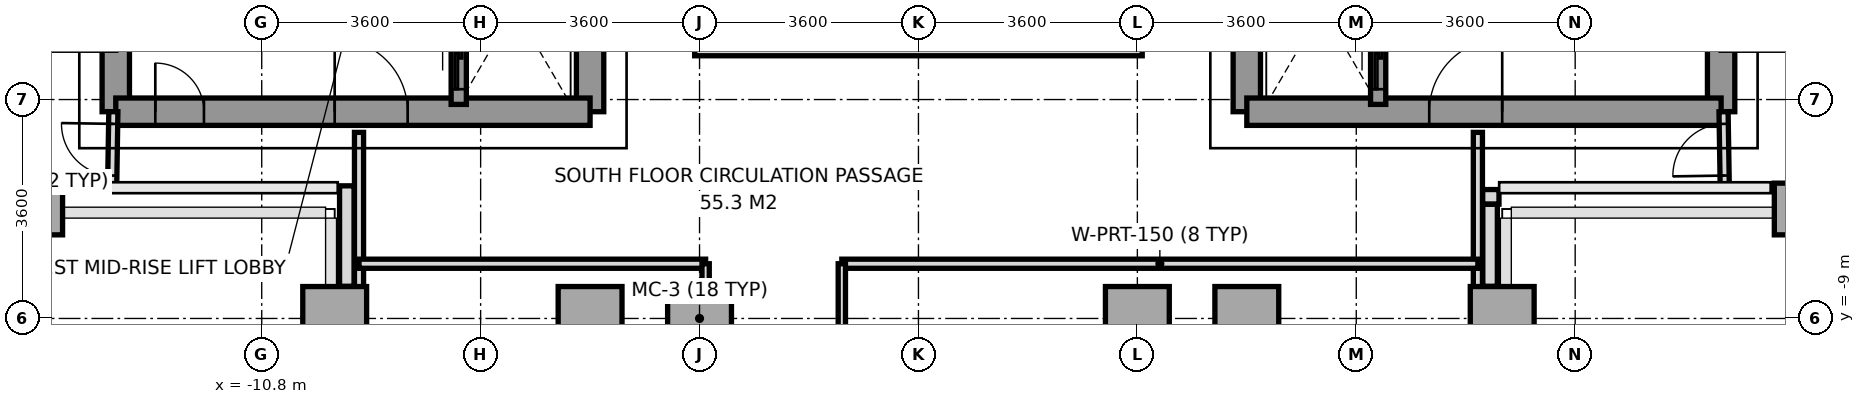
"""IFC4 building model, lengths in metres.
Left out: names, types, materials, properties, quantities, classifications, styles, units other than length and angle.
Written with IfcOpenShell. Run it as: python <this file> out.ifc"""

import sys

from ifc_helpers import new_model, si_unit, direction, frame, frame_2d, origin, origin_2d, place, context, subcontext, project, spatial, rectangle, extrude, source, transform, mapped, element, fill, save


model = new_model("IFC4")
c1 = context("Model", 3, precision=1e-05, world=origin(), true_north=direction((0.0, 1.0)))
c2 = subcontext(c1, "Body", "Model", "MODEL_VIEW")
j1 = project(units=[si_unit("LENGTHUNIT", "METRE"), si_unit("PLANEANGLEUNIT", "RADIAN")], contexts=[c1])
p1 = place(None, origin())
s1 = spatial("IfcSite", under=j1, at=p1, CompositionType="ELEMENT")
p2 = place(p1, origin())
s2 = spatial("IfcBuilding", under=s1, at=p2, CompositionType="ELEMENT")
p3 = place(p2, frame((0.0, 0.0, 104.0)))
s3 = spatial("IfcBuildingStorey", under=s2, at=p3, CompositionType="ELEMENT", Elevation=104.0)
m1 = source(origin(), c2, "Body", "SweptSolid", [
    extrude(rectangle(XDim=0.65, YDim=0.85, at=origin_2d()), origin(), (0.0, 0.0, 1.0), 3.2),
])
p4 = place(p3, frame((-14.4, -7.2, 0.0), z_axis=(0.0, 0.0, 1.0), x_axis=(1.0, 0.0, 0.0)))
e1 = element("IfcColumn", 1, at=p4, inside=s3, PredefinedType="COLUMN", context=c2, shape_type="MappedRepresentation", body=[
    mapped(m1, transform((0.0, 0.0, 0.0), x_axis=(1.0, 0.0, 0.0), y_axis=(0.0, 1.0, 0.0), z_axis=(0.0, 0.0, 1.0), scale=1.0)),
])
m2 = source(origin(), c2, "Body", "SweptSolid", [
    extrude(rectangle(XDim=1.05, YDim=1.05, at=origin_2d()), origin(), (0.0, 0.0, 1.0), 3.2),
])
for number, where, z_axis, x_axis in (
    (2, (-9.6, -9.0, 0.0), (0.0, 0.0, 1.0), (1.0, 0.0, 0.0)),
    (3, (-5.4, -9.0, 0.0), (0.0, 0.0, 1.0), (1.0, 0.0, 0.0)),
    (4, (-3.6, -9.0, 0.0), (0.0, 0.0, 1.0), (1.0, 0.0, 0.0)),
    (5, (3.6, -9.0, 0.0), (0.0, 0.0, 1.0), (1.0, 0.0, 0.0)),
    (6, (5.4, -9.0, 0.0), (0.0, 0.0, 1.0), (1.0, 0.0, 0.0)),
    (7, (9.6, -9.0, 0.0), (0.0, 0.0, 1.0), (1.0, 0.0, 0.0)),
):
    element("IfcColumn", number, at=place(p3, frame(where, z_axis=z_axis, x_axis=x_axis)), inside=s3, PredefinedType="COLUMN", context=c2, shape_type="MappedRepresentation", body=[
        mapped(m2, transform((0.0, 0.0, 0.0), x_axis=(1.0, 0.0, 0.0), y_axis=(0.0, 1.0, 0.0), z_axis=(0.0, 0.0, 1.0), scale=1.0)),
    ])
p5 = place(p3, frame((14.4, -7.2, 0.0), z_axis=(0.0, 0.0, 1.0), x_axis=(1.0, 0.0, 0.0)))
e8 = element("IfcColumn", 8, at=p5, inside=s3, PredefinedType="COLUMN", context=c2, shape_type="MappedRepresentation", body=[
    mapped(m1, transform((0.0, 0.0, 0.0), x_axis=(1.0, 0.0, 0.0), y_axis=(0.0, 1.0, 0.0), z_axis=(0.0, 0.0, 1.0), scale=1.0)),
])
p6 = place(p3, frame((9.547, -7.0, 0.0), z_axis=(0.0, 0.0, 1.0), x_axis=(-1.0, 0.0, 0.0)))
e9 = element("IfcWall", 9, at=p6, inside=s3, PredefinedType="PARAPET", context=c2, shape_type="SweptSolid", body=[
    extrude(rectangle(XDim=0.269, YDim=0.24, at=frame_2d((0.135, 0.0))), origin(), (0.0, 0.0, 1.0), 1.15),
])
p7 = place(p3, frame((9.4, -7.123, 0.0), z_axis=(0.0, 0.0, 1.0), x_axis=(0.0, -1.0, 0.0)))
e10 = element("IfcWall", 10, at=p7, inside=s3, PredefinedType="PARAPET", context=c2, shape_type="SweptSolid", body=[
    extrude(rectangle(XDim=1.349, YDim=0.24, at=frame_2d((0.674, 0.0))), origin(), (0.0, 0.0, 1.0), 1.15),
])
p8 = place(p3, frame((-9.4, -8.472, 0.0), z_axis=(0.0, 0.0, 1.0), x_axis=(0.0, 1.0, 0.0)))
e11 = element("IfcWall", 11, at=p8, inside=s3, PredefinedType="PARAPET", context=c2, shape_type="SweptSolid", body=[
    extrude(rectangle(XDim=1.653, YDim=0.24, at=frame_2d((0.827, 0.0))), origin(), (0.0, 0.0, 1.0), 1.15),
])
p9 = place(p3, frame((-13.2, -5.6, 0.0), z_axis=(0.0, 0.0, 1.0), x_axis=(0.0, 1.0, 0.0)))
e12 = element("IfcWall", 12, at=p9, inside=s3, PredefinedType="SHEAR", context=c2, shape_type="SweptSolid", body=[
    extrude(rectangle(XDim=11.2, YDim=0.45, at=frame_2d((5.6, 0.0))), origin(), (0.0, 0.0, 1.0), 3.2),
])
p10 = place(p3, frame((-5.4, -5.6, 0.0), z_axis=(0.0, 0.0, 1.0), x_axis=(0.0, 1.0, 0.0)))
e13 = element("IfcWall", 13, at=p10, inside=s3, PredefinedType="SHEAR", context=c2, shape_type="SweptSolid", body=[
    extrude(rectangle(XDim=12.5, YDim=0.45, at=frame_2d((6.25, 0.0))), origin(), (0.0, 0.0, 1.0), 3.2),
])
p11 = place(p10, frame((4.55, 0.0, 0.0)))
e14 = element("IfcOpeningElement", 14, at=p11, cuts=e13, PredefinedType="OPENING", context=c2, shape_type="SweptSolid", body=[
    extrude(rectangle(XDim=1.2, YDim=2.2, at=frame_2d((0.6, 1.1))), frame((0.0, 0.235, 0.0), z_axis=(0.0, -1.0, 0.0), x_axis=(1.0, 0.0, 0.0)), (0.0, 0.0, 1.0), 0.47),
])
p12 = place(p10, frame((6.86, 0.0, 0.0)))
e15 = element("IfcOpeningElement", 15, at=p12, cuts=e13, PredefinedType="OPENING", context=c2, shape_type="SweptSolid", body=[
    extrude(rectangle(XDim=0.8, YDim=2.1, at=frame_2d((0.4, 1.05))), frame((0.0, 0.235, 0.0), z_axis=(0.0, -1.0, 0.0), x_axis=(1.0, 0.0, 0.0)), (0.0, 0.0, 1.0), 0.47),
])
p13 = place(p3, frame((-13.2, -5.6, 0.0), z_axis=(0.0, 0.0, 1.0), x_axis=(1.0, 0.0, 0.0)))
e16 = element("IfcWall", 16, at=p13, inside=s3, PredefinedType="SHEAR", context=c2, shape_type="SweptSolid", body=[
    extrude(rectangle(XDim=7.8, YDim=0.45, at=frame_2d((3.9, 0.0))), origin(), (0.0, 0.0, 1.0), 3.2),
])
p14 = place(p13, frame((3.6, 0.0, 0.0)))
e17 = element("IfcOpeningElement", 17, at=p14, cuts=e16, PredefinedType="OPENING", context=c2, shape_type="SweptSolid", body=[
    extrude(rectangle(XDim=1.2, YDim=2.2, at=frame_2d((0.6, 1.1))), frame((0.0, 0.235, 0.0), z_axis=(0.0, -1.0, 0.0), x_axis=(1.0, 0.0, 0.0)), (0.0, 0.0, 1.0), 0.47),
])
p15 = place(p13, frame((0.65, 0.0, 0.0)))
e18 = element("IfcOpeningElement", 18, at=p15, cuts=e16, PredefinedType="OPENING", context=c2, shape_type="SweptSolid", body=[
    extrude(rectangle(XDim=0.8, YDim=2.1, at=frame_2d((0.4, 1.05))), frame((0.0, 0.235, 0.0), z_axis=(0.0, -1.0, 0.0), x_axis=(1.0, 0.0, 0.0)), (0.0, 0.0, 1.0), 0.47),
])
p16 = place(p3, frame((13.2, -5.6, 0.0), z_axis=(0.0, 0.0, 1.0), x_axis=(0.0, 1.0, 0.0)))
e19 = element("IfcWall", 19, at=p16, inside=s3, PredefinedType="SHEAR", context=c2, shape_type="SweptSolid", body=[
    extrude(rectangle(XDim=11.2, YDim=0.45, at=frame_2d((5.6, 0.0))), origin(), (0.0, 0.0, 1.0), 3.2),
])
p17 = place(p3, frame((5.4, -5.6, 0.0), z_axis=(0.0, 0.0, 1.0), x_axis=(0.0, 1.0, 0.0)))
e20 = element("IfcWall", 20, at=p17, inside=s3, PredefinedType="SHEAR", context=c2, shape_type="SweptSolid", body=[
    extrude(rectangle(XDim=12.5, YDim=0.45, at=frame_2d((6.25, 0.0))), origin(), (0.0, 0.0, 1.0), 3.2),
])
p18 = place(p17, frame((4.55, 0.0, 0.0)))
e21 = element("IfcOpeningElement", 21, at=p18, cuts=e20, PredefinedType="OPENING", context=c2, shape_type="SweptSolid", body=[
    extrude(rectangle(XDim=1.2, YDim=2.2, at=frame_2d((0.6, 1.1))), frame((0.0, 0.235, 0.0), z_axis=(0.0, -1.0, 0.0), x_axis=(1.0, 0.0, 0.0)), (0.0, 0.0, 1.0), 0.47),
])
p19 = place(p17, frame((6.86, 0.0, 0.0)))
e22 = element("IfcOpeningElement", 22, at=p19, cuts=e20, PredefinedType="OPENING", context=c2, shape_type="SweptSolid", body=[
    extrude(rectangle(XDim=0.8, YDim=2.1, at=frame_2d((0.4, 1.05))), frame((0.0, 0.235, 0.0), z_axis=(0.0, -1.0, 0.0), x_axis=(1.0, 0.0, 0.0)), (0.0, 0.0, 1.0), 0.47),
])
p20 = place(p3, frame((5.4, -5.6, 0.0), z_axis=(0.0, 0.0, 1.0), x_axis=(1.0, 0.0, 0.0)))
e23 = element("IfcWall", 23, at=p20, inside=s3, PredefinedType="SHEAR", context=c2, shape_type="SweptSolid", body=[
    extrude(rectangle(XDim=7.8, YDim=0.45, at=frame_2d((3.9, 0.0))), origin(), (0.0, 0.0, 1.0), 3.2),
])
p21 = place(p20, frame((3.0, 0.0, 0.0)))
e24 = element("IfcOpeningElement", 24, at=p21, cuts=e23, PredefinedType="OPENING", context=c2, shape_type="SweptSolid", body=[
    extrude(rectangle(XDim=1.2, YDim=2.2, at=frame_2d((0.6, 1.1))), frame((0.0, 0.235, 0.0), z_axis=(0.0, -1.0, 0.0), x_axis=(1.0, 0.0, 0.0)), (0.0, 0.0, 1.0), 0.47),
])
p22 = place(p3, frame((-7.56, -5.48, 0.0), z_axis=(0.0, 0.0, 1.0), x_axis=(0.0, 1.0, 0.0)))
e25 = element("IfcWall", 25, at=p22, inside=s3, PredefinedType="SOLIDWALL", context=c2, shape_type="SweptSolid", body=[
    extrude(rectangle(XDim=1.6, YDim=0.25, at=frame_2d((0.8, 0.0))), origin(), (0.0, 0.0, 1.0), 3.2),
])
p23 = place(p22, frame((0.25, 0.0, 0.0)))
e26 = element("IfcOpeningElement", 26, at=p23, cuts=e25, PredefinedType="OPENING", context=c2, shape_type="SweptSolid", body=[
    extrude(rectangle(XDim=1.1, YDim=2.2, at=frame_2d((0.55, 1.1))), frame((0.0, 0.135, 0.0), z_axis=(0.0, -1.0, 0.0), x_axis=(1.0, 0.0, 0.0)), (0.0, 0.0, 1.0), 0.27),
])
p24 = place(p3, frame((7.56, -5.48, 0.0), z_axis=(0.0, 0.0, 1.0), x_axis=(0.0, 1.0, 0.0)))
e27 = element("IfcWall", 27, at=p24, inside=s3, PredefinedType="SOLIDWALL", context=c2, shape_type="SweptSolid", body=[
    extrude(rectangle(XDim=1.6, YDim=0.25, at=frame_2d((0.8, 0.0))), origin(), (0.0, 0.0, 1.0), 3.2),
])
p25 = place(p24, frame((0.25, 0.0, 0.0)))
e28 = element("IfcOpeningElement", 28, at=p25, cuts=e27, PredefinedType="OPENING", context=c2, shape_type="SweptSolid", body=[
    extrude(rectangle(XDim=1.1, YDim=2.2, at=frame_2d((0.55, 1.1))), frame((0.0, 0.135, 0.0), z_axis=(0.0, -1.0, 0.0), x_axis=(1.0, 0.0, 0.0)), (0.0, 0.0, 1.0), 0.27),
])
for number, where, z_axis, x_axis in (
    (29, (-9.2, -15.68, 0.0), (0.0, 0.0, 1.0), (0.0, 1.0, 0.0)),
    (30, (9.2, -15.68, 0.0), (0.0, 0.0, 1.0), (0.0, 1.0, 0.0)),
):
    element("IfcWall", number, at=place(p3, frame(where, z_axis=z_axis, x_axis=x_axis)), inside=s3, PredefinedType="PARTITIONING", context=c2, shape_type="SweptSolid", body=[
        extrude(rectangle(XDim=9.74, YDim=0.15, at=frame_2d((4.87, 0.0))), origin(), (0.0, 0.0, 1.0), 2.7),
    ])
p26 = place(p3, frame((-9.2, -8.1, 0.0), z_axis=(0.0, 0.0, 1.0), x_axis=(1.0, 0.0, 0.0)))
e31 = element("IfcWall", 31, at=p26, inside=s3, PredefinedType="PARTITIONING", context=c2, shape_type="SweptSolid", body=[
    extrude(rectangle(XDim=5.7, YDim=0.15, at=frame_2d((2.85, 0.0))), origin(), (0.0, 0.0, 1.0), 2.76),
])
p27 = place(p3, frame((-1.26, -8.1, 0.0), z_axis=(0.0, 0.0, 1.0), x_axis=(1.0, 0.0, 0.0)))
e32 = element("IfcWall", 32, at=p27, inside=s3, PredefinedType="PARTITIONING", context=c2, shape_type="SweptSolid", body=[
    extrude(rectangle(XDim=10.46, YDim=0.15, at=frame_2d((5.23, 0.0))), origin(), (0.0, 0.0, 1.0), 2.76),
])
p28 = place(p3, frame((-3.5, -20.42, 0.0), z_axis=(0.0, 0.0, 1.0), x_axis=(0.0, 1.0, 0.0)))
e33 = element("IfcWall", 33, at=p28, inside=s3, PredefinedType="PARTITIONING", context=c2, shape_type="SweptSolid", body=[
    extrude(rectangle(XDim=12.32, YDim=0.12, at=frame_2d((6.16, 0.0))), origin(), (0.0, 0.0, 1.0), 2.7),
])
p29 = place(p28, frame((2.2, 0.0, 0.0)))
e34 = element("IfcOpeningElement", 34, at=p29, cuts=e33, PredefinedType="OPENING", context=c2, shape_type="SweptSolid", body=[
    extrude(rectangle(XDim=0.95, YDim=2.15, at=frame_2d((0.475, 1.075))), frame((0.0, 0.07, 0.0), z_axis=(0.0, -1.0, 0.0), x_axis=(1.0, 0.0, 0.0)), (0.0, 0.0, 1.0), 0.14),
])
p30 = place(p3, frame((-1.26, -20.42, 0.0), z_axis=(0.0, 0.0, 1.0), x_axis=(0.0, 1.0, 0.0)))
e35 = element("IfcWall", 35, at=p30, inside=s3, PredefinedType="PARTITIONING", context=c2, shape_type="SweptSolid", body=[
    extrude(rectangle(XDim=12.32, YDim=0.12, at=frame_2d((6.16, 0.0))), origin(), (0.0, 0.0, 1.0), 2.7),
])
p31 = place(p30, frame((7.22, 0.0, 0.0)))
e36 = element("IfcOpeningElement", 36, at=p31, cuts=e35, PredefinedType="OPENING", context=c2, shape_type="SweptSolid", body=[
    extrude(rectangle(XDim=0.95, YDim=2.15, at=frame_2d((0.475, 1.075))), frame((0.0, 0.07, 0.0), z_axis=(0.0, -1.0, 0.0), x_axis=(1.0, 0.0, 0.0)), (0.0, 0.0, 1.0), 0.14),
])
p32 = place(p30, frame((1.2, 0.0, 0.0)))
e37 = element("IfcOpeningElement", 37, at=p32, cuts=e35, PredefinedType="OPENING", context=c2, shape_type="SweptSolid", body=[
    extrude(rectangle(XDim=0.95, YDim=2.15, at=frame_2d((0.475, 1.075))), frame((0.0, 0.07, 0.0), z_axis=(0.0, -1.0, 0.0), x_axis=(1.0, 0.0, 0.0)), (0.0, 0.0, 1.0), 0.14),
])
p33 = place(p3, frame((-13.26, -6.85, 0.0), z_axis=(0.0, 0.0, 1.0), x_axis=(0.016013571389, 0.999871774545, 0.0)))
e38 = element("IfcWall", 38, at=p33, inside=s3, PredefinedType="PARTITIONING", context=c2, shape_type="SweptSolid", body=[
    extrude(rectangle(XDim=1.25, YDim=0.15, at=frame_2d((0.625, 0.0))), origin(), (0.0, 0.0, 1.0), 3.2),
])
p34 = place(p33, frame((0.2, 0.0, 0.0)))
e39 = element("IfcOpeningElement", 39, at=p34, cuts=e38, PredefinedType="OPENING", context=c2, shape_type="SweptSolid", body=[
    extrude(rectangle(XDim=0.85, YDim=2.1, at=frame_2d((0.425, 1.05))), frame((0.0, 0.085, 0.0), z_axis=(0.0, -1.0, 0.0), x_axis=(1.0, 0.0, 0.0)), (0.0, 0.0, 1.0), 0.17),
])
p35 = place(p3, frame((13.26, -6.85, 0.0), z_axis=(0.0, 0.0, 1.0), x_axis=(-0.016013571389, 0.999871774545, 0.0)))
e40 = element("IfcWall", 40, at=p35, inside=s3, PredefinedType="PARTITIONING", context=c2, shape_type="SweptSolid", body=[
    extrude(rectangle(XDim=1.25, YDim=0.15, at=frame_2d((0.625, 0.0))), origin(), (0.0, 0.0, 1.0), 3.2),
])
p36 = place(p35, frame((0.2, 0.0, 0.0)))
e41 = element("IfcOpeningElement", 41, at=p36, cuts=e40, PredefinedType="OPENING", context=c2, shape_type="SweptSolid", body=[
    extrude(rectangle(XDim=0.85, YDim=2.1, at=frame_2d((0.425, 1.05))), frame((0.0, 0.085, 0.0), z_axis=(0.0, -1.0, 0.0), x_axis=(1.0, 0.0, 0.0)), (0.0, 0.0, 1.0), 0.17),
])
p37 = place(p3, frame((-3.68, -4.56, 0.0), z_axis=(0.0, 0.0, 1.0), x_axis=(1.0, 0.0, 0.0)))
e42 = element("IfcWall", 42, at=p37, inside=s3, PredefinedType="PARAPET", context=c2, shape_type="SweptSolid", body=[
    extrude(rectangle(XDim=7.36, YDim=0.24, at=frame_2d((3.68, 0.0))), origin(), (0.0, 0.0, 1.0), 1.15),
])
m3 = source(origin(), c2, "Body", "SweptSolid", [
    extrude(rectangle(XDim=1.2, YDim=2.2, at=frame_2d((0.6, 1.1))), frame((0.0, 0.025, 0.0), z_axis=(0.0, -1.0, 0.0), x_axis=(1.0, 0.0, 0.0)), (0.0, 0.0, 1.0), 0.05),
])
p38 = place(p14, origin())
e43 = element("IfcDoor", 43, at=p38, inside=s3, OperationType="SINGLE_SWING_LEFT", PredefinedType="DOOR", context=c2, shape_type="MappedRepresentation", body=[
    mapped(m3, transform((0.0, 0.0, 0.0), x_axis=(1.0, 0.0, 0.0), y_axis=(0.0, 1.0, 0.0), z_axis=(0.0, 0.0, 1.0), scale=1.0)),
])
fill(e17, e43)
p39 = place(p21, origin())
e44 = element("IfcDoor", 44, at=p39, inside=s3, OperationType="SINGLE_SWING_RIGHT", PredefinedType="DOOR", context=c2, shape_type="MappedRepresentation", body=[
    mapped(m3, transform((0.0, 0.0, 0.0), x_axis=(1.0, 0.0, 0.0), y_axis=(0.0, 1.0, 0.0), z_axis=(0.0, 0.0, 1.0), scale=1.0)),
])
fill(e24, e44)
m4 = source(origin(), c2, "Body", "SweptSolid", [
    extrude(rectangle(XDim=0.8, YDim=2.1, at=frame_2d((0.4, 1.05))), frame((0.0, 0.025, 0.0), z_axis=(0.0, -1.0, 0.0), x_axis=(1.0, 0.0, 0.0)), (0.0, 0.0, 1.0), 0.05),
])
p40 = place(p15, origin())
e45 = element("IfcDoor", 45, at=p40, inside=s3, OperationType="SINGLE_SWING_LEFT", PredefinedType="DOOR", context=c2, shape_type="MappedRepresentation", body=[
    mapped(m4, transform((0.0, 0.0, 0.0), x_axis=(1.0, 0.0, 0.0), y_axis=(0.0, 1.0, 0.0), z_axis=(0.0, 0.0, 1.0), scale=1.0)),
])
fill(e18, e45)
m5 = source(origin(), c2, "Body", "SweptSolid", [
    extrude(rectangle(XDim=1.1, YDim=2.2, at=frame_2d((0.55, 1.1))), frame((0.0, 0.025, 0.0), z_axis=(0.0, -1.0, 0.0), x_axis=(1.0, 0.0, 0.0)), (0.0, 0.0, 1.0), 0.05),
])
p41 = place(p23, origin())
e46 = element("IfcDoor", 46, at=p41, inside=s3, OperationType="SLIDING_TO_LEFT", PredefinedType="DOOR", context=c2, shape_type="MappedRepresentation", body=[
    mapped(m5, transform((0.0, 0.0, 0.0), x_axis=(1.0, 0.0, 0.0), y_axis=(0.0, 1.0, 0.0), z_axis=(0.0, 0.0, 1.0), scale=1.0)),
])
fill(e26, e46)
p42 = place(p25, origin())
e47 = element("IfcDoor", 47, at=p42, inside=s3, OperationType="SLIDING_TO_LEFT", PredefinedType="DOOR", context=c2, shape_type="MappedRepresentation", body=[
    mapped(m5, transform((0.0, 0.0, 0.0), x_axis=(1.0, 0.0, 0.0), y_axis=(0.0, 1.0, 0.0), z_axis=(0.0, 0.0, 1.0), scale=1.0)),
])
fill(e28, e47)
m6 = source(origin(), c2, "Body", "SweptSolid", [
    extrude(rectangle(XDim=0.85, YDim=2.1, at=frame_2d((0.425, 1.05))), frame((0.0, 0.025, 0.0), z_axis=(0.0, -1.0, 0.0), x_axis=(1.0, 0.0, 0.0)), (0.0, 0.0, 1.0), 0.05),
])
p43 = place(p34, origin())
e48 = element("IfcDoor", 48, at=p43, inside=s3, OperationType="SINGLE_SWING_RIGHT", PredefinedType="DOOR", context=c2, shape_type="MappedRepresentation", body=[
    mapped(m6, transform((0.0, 0.0, 0.0), x_axis=(1.0, 0.0, 0.0), y_axis=(0.0, 1.0, 0.0), z_axis=(0.0, 0.0, 1.0), scale=1.0)),
])
fill(e39, e48)
p44 = place(p36, origin())
e49 = element("IfcDoor", 49, at=p44, inside=s3, OperationType="SINGLE_SWING_LEFT", PredefinedType="DOOR", context=c2, shape_type="MappedRepresentation", body=[
    mapped(m6, transform((0.0, 0.0, 0.0), x_axis=(1.0, 0.0, 0.0), y_axis=(0.0, 1.0, 0.0), z_axis=(0.0, 0.0, 1.0), scale=1.0)),
])
fill(e41, e49)
save(model, sys.argv[1])
